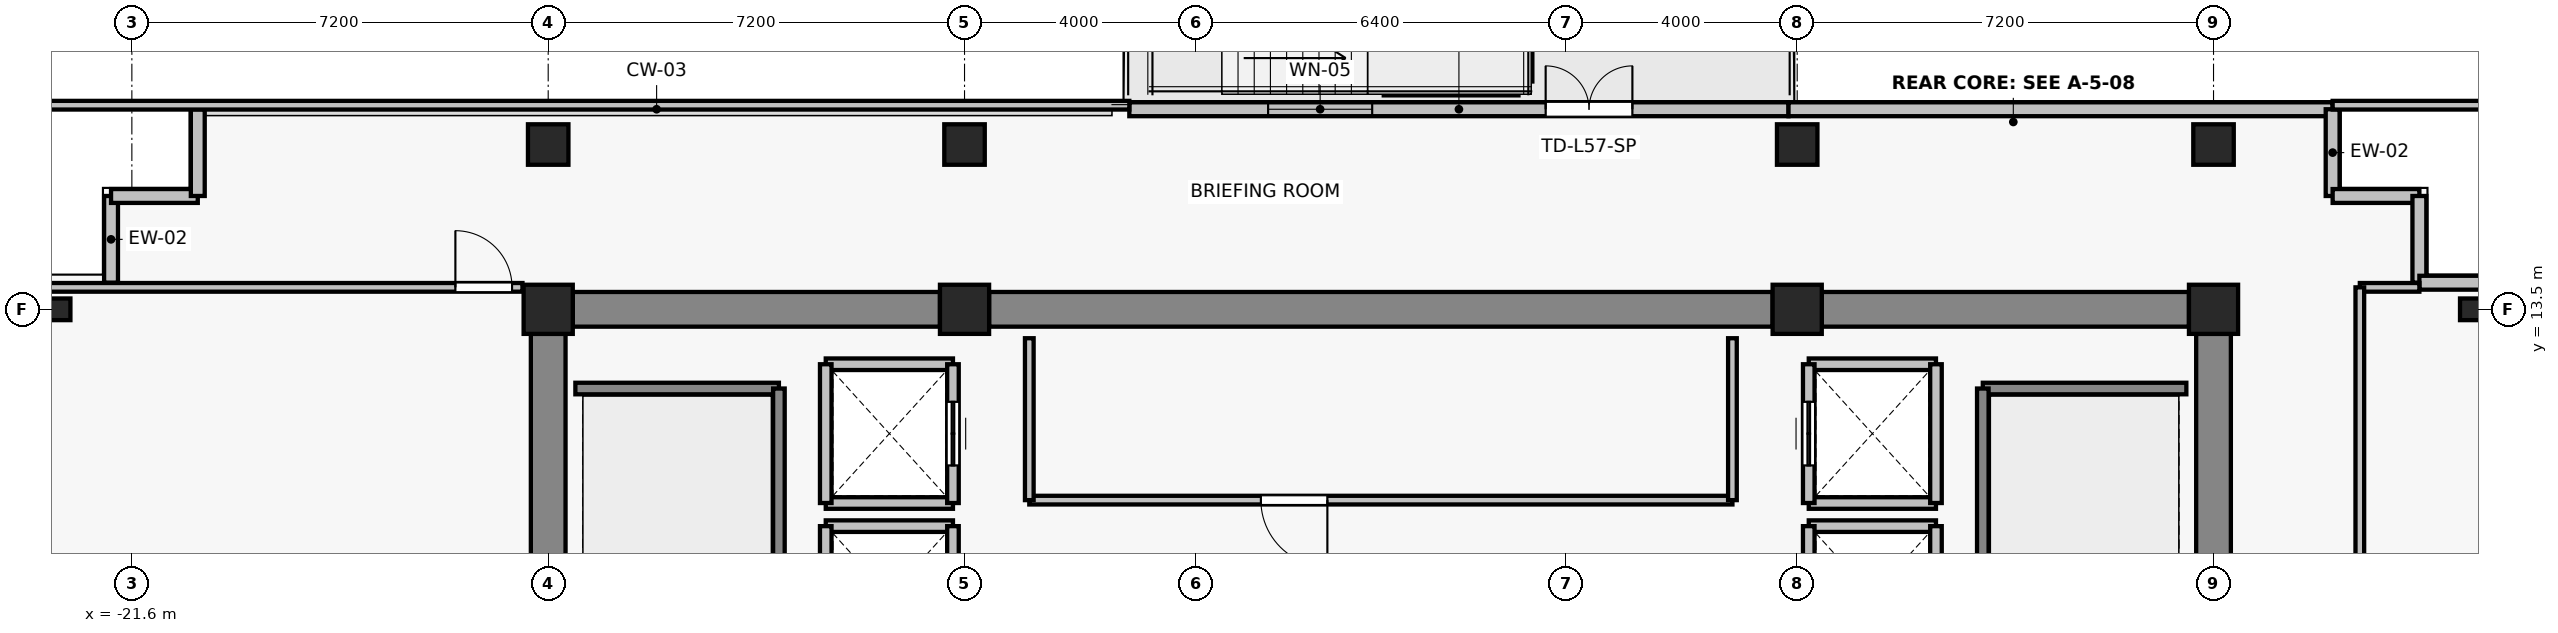
"""IFC4 building model, lengths in metres.
Left out: names, types, materials, properties, quantities, classifications, styles, units other than length and angle.
Written with IfcOpenShell. Run it as: python <this file> out.ifc"""

import sys

from ifc_helpers import new_model, si_unit, direction, frame, frame_2d, origin, origin_2d, place, context, subcontext, project, spatial, rectangle, i_section, extrude, source, transform, mapped, element, fill, save


model = new_model("IFC4")
c1 = context("Model", 3, precision=1e-05, world=origin(), true_north=direction((0.0, 1.0)))
c2 = subcontext(c1, "Body", "Model", "MODEL_VIEW")
j1 = project(units=[si_unit("LENGTHUNIT", "METRE"), si_unit("PLANEANGLEUNIT", "RADIAN")], contexts=[c1])
p1 = place(None, origin())
s1 = spatial("IfcSite", under=j1, at=p1, CompositionType="ELEMENT")
p2 = place(p1, origin())
s2 = spatial("IfcBuilding", under=s1, at=p2, CompositionType="ELEMENT")
p3 = place(p2, frame((0.0, 0.0, 205.6)))
s3 = spatial("IfcBuildingStorey", under=s2, at=p3, CompositionType="ELEMENT", Elevation=205.6)
for number, where, z_axis, x_axis in (
    (1, (-14.4, 13.5, 0.0), (0.0, 0.0, 1.0), (1.0, 0.0, 0.0)),
    (2, (-7.2, 13.5, 0.0), (0.0, 0.0, 1.0), (1.0, 0.0, 0.0)),
    (3, (7.2, 13.5, 0.0), (0.0, 0.0, 1.0), (1.0, 0.0, 0.0)),
    (4, (14.4, 13.5, 0.0), (0.0, 0.0, 1.0), (1.0, 0.0, 0.0)),
):
    element("IfcColumn", number, at=place(p3, frame(where, z_axis=z_axis, x_axis=x_axis)), inside=s3, PredefinedType="COLUMN", context=c2, shape_type="SweptSolid", body=[
        extrude(rectangle(XDim=0.85, YDim=0.85, at=origin_2d()), origin(), (0.0, 0.0, 1.0), 3.3),
    ])
for number, where, z_axis, x_axis in (
    (5, (-14.4, 16.35, 0.0), (0.0, 0.0, 1.0), (1.0, 0.0, 0.0)),
    (6, (-7.2, 16.35, 0.0), (0.0, 0.0, 1.0), (1.0, 0.0, 0.0)),
    (7, (7.2, 16.35, 0.0), (0.0, 0.0, 1.0), (1.0, 0.0, 0.0)),
    (8, (14.4, 16.35, 0.0), (0.0, 0.0, 1.0), (1.0, 0.0, 0.0)),
):
    element("IfcColumn", number, at=place(p3, frame(where, z_axis=z_axis, x_axis=x_axis)), inside=s3, PredefinedType="COLUMN", context=c2, shape_type="SweptSolid", body=[
        extrude(rectangle(XDim=0.7, YDim=0.7, at=origin_2d()), origin(), (0.0, 0.0, 1.0), 3.3),
    ])
for number, where, z_axis, x_axis in (
    (9, (-22.85, 13.5, 0.0), (0.0, 0.0, 1.0), (1.0, 0.0, 0.0)),
    (10, (18.85, 13.5, 0.0), (0.0, 0.0, 1.0), (1.0, 0.0, 0.0)),
):
    element("IfcColumn", number, at=place(p3, frame(where, z_axis=z_axis, x_axis=x_axis)), inside=s3, PredefinedType="COLUMN", context=c2, shape_type="SweptSolid", body=[
        extrude(i_section(OverallWidth=0.375, OverallDepth=0.375, WebThickness=0.017, FlangeThickness=0.027, FilletRadius=0.015, at=origin_2d()), origin(), (0.0, 0.0, 1.0), 3.3),
    ])
p4 = place(p3, frame((-13.975, 13.5, 0.0), z_axis=(0.0, 0.0, 1.0), x_axis=(1.0, 0.0, 0.0)))
e11 = element("IfcWall", 11, at=p4, inside=s3, PredefinedType="SHEAR", context=c2, shape_type="SweptSolid", body=[
    extrude(rectangle(XDim=6.35, YDim=0.6, at=frame_2d((3.175, 0.0))), origin(), (0.0, 0.0, 1.0), 3.075),
])
p5 = place(p3, frame((-6.775, 13.5, 0.0), z_axis=(0.0, 0.0, 1.0), x_axis=(1.0, 0.0, 0.0)))
e12 = element("IfcWall", 12, at=p5, inside=s3, PredefinedType="SHEAR", context=c2, shape_type="SweptSolid", body=[
    extrude(rectangle(XDim=13.55, YDim=0.6, at=frame_2d((6.775, 0.0))), origin(), (0.0, 0.0, 1.0), 3.075),
])
p6 = place(p3, frame((7.625, 13.5, 0.0), z_axis=(0.0, 0.0, 1.0), x_axis=(1.0, 0.0, 0.0)))
e13 = element("IfcWall", 13, at=p6, inside=s3, PredefinedType="SHEAR", context=c2, shape_type="SweptSolid", body=[
    extrude(rectangle(XDim=6.35, YDim=0.6, at=frame_2d((3.175, 0.0))), origin(), (0.0, 0.0, 1.0), 3.075),
])
for number, where, z_axis, x_axis in (
    (14, (-14.4, 7.025, 0.0), (0.0, 0.0, 1.0), (0.0, 1.0, 0.0)),
    (15, (14.4, 7.025, 0.0), (0.0, 0.0, 1.0), (0.0, 1.0, 0.0)),
):
    element("IfcWall", number, at=place(p3, frame(where, z_axis=z_axis, x_axis=x_axis)), inside=s3, PredefinedType="SHEAR", context=c2, shape_type="SweptSolid", body=[
        extrude(rectangle(XDim=6.05, YDim=0.6, at=frame_2d((3.025, 0.0))), origin(), (0.0, 0.0, 1.0), 3.075),
    ])
p7 = place(p3, frame((-4.35, 16.96, 0.0), z_axis=(0.0, 0.0, 1.0), x_axis=(1.0, 0.0, 0.0)))
e16 = element("IfcWall", 16, at=p7, inside=s3, PredefinedType="SOLIDWALL", context=c2, shape_type="SweptSolid", body=[
    extrude(rectangle(XDim=11.4, YDim=0.24, at=frame_2d((5.7, 0.0))), origin(), (0.0, 0.0, 1.0), 2.59),
])
p8 = place(p7, frame((7.2, 0.0, 0.0)))
e17 = element("IfcOpeningElement", 17, at=p8, cuts=e16, PredefinedType="OPENING", context=c2, shape_type="SweptSolid", body=[
    extrude(rectangle(XDim=1.5, YDim=2.2, at=frame_2d((0.75, 1.1))), frame((0.0, 0.13, 0.0), z_axis=(0.0, -1.0, 0.0), x_axis=(1.0, 0.0, 0.0)), (0.0, 0.0, 1.0), 0.26),
])
p9 = place(p7, frame((2.4, 0.0, 0.85)))
e18 = element("IfcOpeningElement", 18, at=p9, cuts=e16, PredefinedType="OPENING", context=c2, shape_type="SweptSolid", body=[
    extrude(rectangle(XDim=1.8, YDim=1.6, at=frame_2d((0.9, 0.8))), frame((0.0, 0.13, 0.0), z_axis=(0.0, -1.0, 0.0), x_axis=(1.0, 0.0, 0.0)), (0.0, 0.0, 1.0), 0.26),
])
for number, where, z_axis, x_axis in (
    (19, (-21.96, 15.46, 0.0), (0.0, 0.0, 1.0), (0.0, -1.0, 0.0)),
    (20, (-20.46, 15.46, 0.0), (0.0, 0.0, 1.0), (-1.0, 0.0, 0.0)),
    (21, (-20.46, 16.96, 0.0), (0.0, 0.0, 1.0), (0.0, -1.0, 0.0)),
):
    element("IfcWall", number, at=place(p3, frame(where, z_axis=z_axis, x_axis=x_axis)), inside=s3, PredefinedType="SOLIDWALL", context=c2, shape_type="SweptSolid", body=[
        extrude(rectangle(XDim=1.5, YDim=0.24, at=frame_2d((0.75, 0.0))), origin(), (0.0, 0.0, 1.0), 3.075),
    ])
p10 = place(p3, frame((16.46, 16.96, 0.0), z_axis=(0.0, 0.0, 1.0), x_axis=(-1.0, 0.0, 0.0)))
e22 = element("IfcWall", 22, at=p10, inside=s3, PredefinedType="SOLIDWALL", context=c2, shape_type="SweptSolid", body=[
    extrude(rectangle(XDim=9.41, YDim=0.24, at=frame_2d((4.705, 0.0))), origin(), (0.0, 0.0, 1.0), 2.59),
])
for number, where, z_axis, x_axis in (
    (23, (16.46, 15.46, 0.0), (0.0, 0.0, 1.0), (0.0, 1.0, 0.0)),
    (24, (17.96, 15.46, 0.0), (0.0, 0.0, 1.0), (-1.0, 0.0, 0.0)),
    (25, (17.96, 13.96, 0.0), (0.0, 0.0, 1.0), (0.0, 1.0, 0.0)),
    (26, (19.46, 13.96, 0.0), (0.0, 0.0, 1.0), (-1.0, 0.0, 0.0)),
):
    element("IfcWall", number, at=place(p3, frame(where, z_axis=z_axis, x_axis=x_axis)), inside=s3, PredefinedType="SOLIDWALL", context=c2, shape_type="SweptSolid", body=[
        extrude(rectangle(XDim=1.5, YDim=0.24, at=frame_2d((0.75, 0.0))), origin(), (0.0, 0.0, 1.0), 3.075),
    ])
p11 = place(p3, frame((2.52, 17.44, -0.25), z_axis=(0.0, 0.0, 1.0), x_axis=(0.0, 1.0, 0.0)))
e27 = element("IfcWall", 27, at=p11, inside=s3, PredefinedType="SOLIDWALL", context=c2, shape_type="SweptSolid", body=[
    extrude(rectangle(XDim=2.18, YDim=0.2, at=frame_2d((1.09, 0.0))), origin(), (0.0, 0.0, 1.0), 1.7),
])
p12 = place(p3, frame((0.05, 17.3, -0.25), z_axis=(0.0, 0.0, 1.0), x_axis=(1.0, 0.0, 0.0)))
e28 = element("IfcWall", 28, at=p12, inside=s3, PredefinedType="SOLIDWALL", context=c2, shape_type="SweptSolid", body=[
    extrude(rectangle(XDim=2.33, YDim=0.2, at=frame_2d((1.165, 0.0))), origin(), (0.0, 0.0, 1.0), 1.7),
])
p13 = place(p3, frame((-9.6, 9.75, 0.0), z_axis=(0.0, 0.0, 1.0), x_axis=(1.0, 0.0, 0.0)))
e29 = element("IfcWall", 29, at=p13, inside=s3, PredefinedType="SOLIDWALL", context=c2, shape_type="SweptSolid", body=[
    extrude(rectangle(XDim=2.2, YDim=0.2, at=frame_2d((1.1, 0.0))), origin(), (0.0, 0.0, 1.0), 2.615),
])
p14 = place(p3, frame((-9.6, 7.35, 0.0), z_axis=(0.0, 0.0, 1.0), x_axis=(0.0, 1.0, 0.0)))
e30 = element("IfcWall", 30, at=p14, inside=s3, PredefinedType="SOLIDWALL", context=c2, shape_type="SweptSolid", body=[
    extrude(rectangle(XDim=2.4, YDim=0.2, at=frame_2d((1.2, 0.0))), origin(), (0.0, 0.0, 1.0), 3.075),
])
p15 = place(p3, frame((-7.4, 9.75, 0.0), z_axis=(0.0, 0.0, 1.0), x_axis=(0.0, -1.0, 0.0)))
e31 = element("IfcWall", 31, at=p15, inside=s3, PredefinedType="SOLIDWALL", context=c2, shape_type="SweptSolid", body=[
    extrude(rectangle(XDim=2.4, YDim=0.2, at=frame_2d((1.2, 0.0))), origin(), (0.0, 0.0, 1.0), 2.615),
])
p16 = place(p15, frame((0.65, 0.0, 0.0)))
e32 = element("IfcOpeningElement", 32, at=p16, cuts=e31, PredefinedType="OPENING", context=c2, shape_type="SweptSolid", body=[
    extrude(rectangle(XDim=1.1, YDim=2.2, at=frame_2d((0.55, 1.1))), frame((0.0, 0.11, 0.0), z_axis=(0.0, -1.0, 0.0), x_axis=(1.0, 0.0, 0.0)), (0.0, 0.0, 1.0), 0.22),
])
for number, where, z_axis, x_axis in (
    (33, (-7.4, 10.15, 0.0), (0.0, 0.0, 1.0), (-1.0, 0.0, 0.0)),
    (34, (-9.6, 12.55, 0.0), (0.0, 0.0, 1.0), (1.0, 0.0, 0.0)),
):
    element("IfcWall", number, at=place(p3, frame(where, z_axis=z_axis, x_axis=x_axis)), inside=s3, PredefinedType="SOLIDWALL", context=c2, shape_type="SweptSolid", body=[
        extrude(rectangle(XDim=2.2, YDim=0.2, at=frame_2d((1.1, 0.0))), origin(), (0.0, 0.0, 1.0), 2.615),
    ])
p17 = place(p3, frame((-9.6, 10.15, 0.0), z_axis=(0.0, 0.0, 1.0), x_axis=(0.0, 1.0, 0.0)))
e35 = element("IfcWall", 35, at=p17, inside=s3, PredefinedType="SOLIDWALL", context=c2, shape_type="SweptSolid", body=[
    extrude(rectangle(XDim=2.4, YDim=0.2, at=frame_2d((1.2, 0.0))), origin(), (0.0, 0.0, 1.0), 3.075),
])
p18 = place(p3, frame((-7.4, 12.55, 0.0), z_axis=(0.0, 0.0, 1.0), x_axis=(0.0, -1.0, 0.0)))
e36 = element("IfcWall", 36, at=p18, inside=s3, PredefinedType="SOLIDWALL", context=c2, shape_type="SweptSolid", body=[
    extrude(rectangle(XDim=2.4, YDim=0.2, at=frame_2d((1.2, 0.0))), origin(), (0.0, 0.0, 1.0), 2.615),
])
p19 = place(p18, frame((0.65, 0.0, 0.0)))
e37 = element("IfcOpeningElement", 37, at=p19, cuts=e36, PredefinedType="OPENING", context=c2, shape_type="SweptSolid", body=[
    extrude(rectangle(XDim=1.1, YDim=2.2, at=frame_2d((0.55, 1.1))), frame((0.0, 0.11, 0.0), z_axis=(0.0, -1.0, 0.0), x_axis=(1.0, 0.0, 0.0)), (0.0, 0.0, 1.0), 0.22),
])
p20 = place(p3, frame((7.4, 9.75, 0.0), z_axis=(0.0, 0.0, 1.0), x_axis=(1.0, 0.0, 0.0)))
e38 = element("IfcWall", 38, at=p20, inside=s3, PredefinedType="SOLIDWALL", context=c2, shape_type="SweptSolid", body=[
    extrude(rectangle(XDim=2.2, YDim=0.2, at=frame_2d((1.1, 0.0))), origin(), (0.0, 0.0, 1.0), 2.615),
])
p21 = place(p3, frame((7.4, 7.35, 0.0), z_axis=(0.0, 0.0, 1.0), x_axis=(0.0, 1.0, 0.0)))
e39 = element("IfcWall", 39, at=p21, inside=s3, PredefinedType="SOLIDWALL", context=c2, shape_type="SweptSolid", body=[
    extrude(rectangle(XDim=2.4, YDim=0.2, at=frame_2d((1.2, 0.0))), origin(), (0.0, 0.0, 1.0), 2.615),
])
p22 = place(p21, frame((0.65, 0.0, 0.0)))
e40 = element("IfcOpeningElement", 40, at=p22, cuts=e39, PredefinedType="OPENING", context=c2, shape_type="SweptSolid", body=[
    extrude(rectangle(XDim=1.1, YDim=2.2, at=frame_2d((0.55, 1.1))), frame((0.0, 0.11, 0.0), z_axis=(0.0, -1.0, 0.0), x_axis=(1.0, 0.0, 0.0)), (0.0, 0.0, 1.0), 0.22),
])
p23 = place(p3, frame((9.6, 9.75, 0.0), z_axis=(0.0, 0.0, 1.0), x_axis=(0.0, -1.0, 0.0)))
e41 = element("IfcWall", 41, at=p23, inside=s3, PredefinedType="SOLIDWALL", context=c2, shape_type="SweptSolid", body=[
    extrude(rectangle(XDim=2.4, YDim=0.2, at=frame_2d((1.2, 0.0))), origin(), (0.0, 0.0, 1.0), 3.075),
])
for number, where, z_axis, x_axis in (
    (42, (9.6, 10.15, 0.0), (0.0, 0.0, 1.0), (-1.0, 0.0, 0.0)),
    (43, (7.4, 12.55, 0.0), (0.0, 0.0, 1.0), (1.0, 0.0, 0.0)),
):
    element("IfcWall", number, at=place(p3, frame(where, z_axis=z_axis, x_axis=x_axis)), inside=s3, PredefinedType="SOLIDWALL", context=c2, shape_type="SweptSolid", body=[
        extrude(rectangle(XDim=2.2, YDim=0.2, at=frame_2d((1.1, 0.0))), origin(), (0.0, 0.0, 1.0), 2.615),
    ])
p24 = place(p3, frame((7.4, 10.15, 0.0), z_axis=(0.0, 0.0, 1.0), x_axis=(0.0, 1.0, 0.0)))
e44 = element("IfcWall", 44, at=p24, inside=s3, PredefinedType="SOLIDWALL", context=c2, shape_type="SweptSolid", body=[
    extrude(rectangle(XDim=2.4, YDim=0.2, at=frame_2d((1.2, 0.0))), origin(), (0.0, 0.0, 1.0), 2.615),
])
p25 = place(p24, frame((0.65, 0.0, 0.0)))
e45 = element("IfcOpeningElement", 45, at=p25, cuts=e44, PredefinedType="OPENING", context=c2, shape_type="SweptSolid", body=[
    extrude(rectangle(XDim=1.1, YDim=2.2, at=frame_2d((0.55, 1.1))), frame((0.0, 0.11, 0.0), z_axis=(0.0, -1.0, 0.0), x_axis=(1.0, 0.0, 0.0)), (0.0, 0.0, 1.0), 0.22),
])
p26 = place(p3, frame((9.6, 12.55, 0.0), z_axis=(0.0, 0.0, 1.0), x_axis=(0.0, -1.0, 0.0)))
e46 = element("IfcWall", 46, at=p26, inside=s3, PredefinedType="SOLIDWALL", context=c2, shape_type="SweptSolid", body=[
    extrude(rectangle(XDim=2.4, YDim=0.2, at=frame_2d((1.2, 0.0))), origin(), (0.0, 0.0, 1.0), 3.075),
])
p27 = place(p3, frame((-13.93, 12.13, 0.0), z_axis=(0.0, 0.0, 1.0), x_axis=(1.0, 0.0, 0.0)))
e47 = element("IfcWall", 47, at=p27, inside=s3, PredefinedType="SOLIDWALL", context=c2, shape_type="SweptSolid", body=[
    extrude(rectangle(XDim=3.52, YDim=0.2, at=frame_2d((1.76, 0.0))), origin(), (0.0, 0.0, 1.0), 3.075),
])
p28 = place(p3, frame((-10.41, 12.13, 0.0), z_axis=(0.0, 0.0, 1.0), x_axis=(0.0, -1.0, 0.0)))
e48 = element("IfcWall", 48, at=p28, inside=s3, PredefinedType="SOLIDWALL", context=c2, shape_type="SweptSolid", body=[
    extrude(rectangle(XDim=8.84, YDim=0.2, at=frame_2d((4.42, 0.0))), origin(), (0.0, 0.0, 1.0), 3.075),
])
p29 = place(p3, frame((10.41, 12.13, 0.0), z_axis=(0.0, 0.0, 1.0), x_axis=(1.0, 0.0, 0.0)))
e49 = element("IfcWall", 49, at=p29, inside=s3, PredefinedType="SOLIDWALL", context=c2, shape_type="SweptSolid", body=[
    extrude(rectangle(XDim=3.52, YDim=0.2, at=frame_2d((1.76, 0.0))), origin(), (0.0, 0.0, 1.0), 3.075),
])
p30 = place(p3, frame((10.41, 3.29, 0.0), z_axis=(0.0, 0.0, 1.0), x_axis=(0.0, 1.0, 0.0)))
e50 = element("IfcWall", 50, at=p30, inside=s3, PredefinedType="SOLIDWALL", context=c2, shape_type="SweptSolid", body=[
    extrude(rectangle(XDim=8.84, YDim=0.2, at=frame_2d((4.42, 0.0))), origin(), (0.0, 0.0, 1.0), 3.075),
])
p31 = place(p3, frame((6.08, 10.2, 0.0), z_axis=(0.0, 0.0, 1.0), x_axis=(-1.0, 0.0, 0.0)))
e51 = element("IfcWall", 51, at=p31, inside=s3, PredefinedType="PARTITIONING", context=c2, shape_type="SweptSolid", body=[
    extrude(rectangle(XDim=12.16, YDim=0.15, at=frame_2d((6.08, 0.0))), origin(), (0.0, 0.0, 1.0), 2.59),
])
p32 = place(p31, frame((7.005, 0.0, 0.0)))
e52 = element("IfcOpeningElement", 52, at=p32, cuts=e51, PredefinedType="OPENING", context=c2, shape_type="SweptSolid", body=[
    extrude(rectangle(XDim=1.15, YDim=2.15, at=frame_2d((0.575, 1.075))), frame((0.0, 0.085, 0.0), z_axis=(0.0, -1.0, 0.0), x_axis=(1.0, 0.0, 0.0)), (0.0, 0.0, 1.0), 0.17),
])
for number, where, z_axis, x_axis in (
    (53, (-6.08, 10.2, 0.0), (0.0, 0.0, 1.0), (0.0, 1.0, 0.0)),
    (54, (6.08, 13.0, 0.0), (0.0, 0.0, 1.0), (0.0, -1.0, 0.0)),
):
    element("IfcWall", number, at=place(p3, frame(where, z_axis=z_axis, x_axis=x_axis)), inside=s3, PredefinedType="PARTITIONING", context=c2, shape_type="SweptSolid", body=[
        extrude(rectangle(XDim=2.8, YDim=0.15, at=frame_2d((1.4, 0.0))), origin(), (0.0, 0.0, 1.0), 3.075),
    ])
p33 = place(p3, frame((-23.53, 13.88, 0.0), z_axis=(0.0, 0.0, 1.0), x_axis=(1.0, 0.0, 0.0)))
e55 = element("IfcWall", 55, at=p33, inside=s3, PredefinedType="PARTITIONING", context=c2, shape_type="SweptSolid", body=[
    extrude(rectangle(XDim=8.685, YDim=0.15, at=frame_2d((4.343, 0.0))), origin(), (0.0, 0.0, 1.0), 3.075),
])
p34 = place(p33, frame((7.525, 0.0, 0.0)))
e56 = element("IfcOpeningElement", 56, at=p34, cuts=e55, PredefinedType="OPENING", context=c2, shape_type="SweptSolid", body=[
    extrude(rectangle(XDim=0.98, YDim=2.15, at=frame_2d((0.49, 1.075))), frame((0.0, 0.085, 0.0), z_axis=(0.0, -1.0, 0.0), x_axis=(1.0, 0.0, 0.0)), (0.0, 0.0, 1.0), 0.17),
])
p35 = place(p3, frame((16.93, 13.88, 0.0), z_axis=(0.0, 0.0, 1.0), x_axis=(1.0, 0.0, 0.0)))
e57 = element("IfcWall", 57, at=p35, inside=s3, PredefinedType="PARTITIONING", context=c2, shape_type="SweptSolid", body=[
    extrude(rectangle(XDim=1.03, YDim=0.15, at=frame_2d((0.515, 0.0))), origin(), (0.0, 0.0, 1.0), 3.075),
])
p36 = place(p3, frame((16.93, -1.77, 0.0), z_axis=(0.0, 0.0, 1.0), x_axis=(0.0, 1.0, 0.0)))
e58 = element("IfcWall", 58, at=p36, inside=s3, PredefinedType="PARTITIONING", context=c2, shape_type="SweptSolid", body=[
    extrude(rectangle(XDim=15.65, YDim=0.15, at=frame_2d((7.825, 0.0))), origin(), (0.0, 0.0, 1.0), 2.615),
])
p37 = place(p36, frame((7.335, 0.0, 0.0)))
e59 = element("IfcOpeningElement", 59, at=p37, cuts=e58, PredefinedType="OPENING", context=c2, shape_type="SweptSolid", body=[
    extrude(rectangle(XDim=0.98, YDim=2.15, at=frame_2d((0.49, 1.075))), frame((0.0, 0.085, 0.0), z_axis=(0.0, -1.0, 0.0), x_axis=(1.0, 0.0, 0.0)), (0.0, 0.0, 1.0), 0.17),
])
p38 = place(p3, frame((-23.53, 17.03, 0.0), z_axis=(0.0, 0.0, 1.0), x_axis=(1.0, 0.0, 0.0)))
e60 = element("IfcWall", 60, at=p38, inside=s3, PredefinedType="PARTITIONING", context=c2, shape_type="SweptSolid", body=[
    extrude(rectangle(XDim=19.18, YDim=0.15, at=frame_2d((9.59, 0.0))), origin(), (0.0, 0.0, 1.0), 2.59),
])
p39 = place(p3, frame((16.46, 17.03, 0.0), z_axis=(0.0, 0.0, 1.0), x_axis=(1.0, 0.0, 0.0)))
e61 = element("IfcWall", 61, at=p39, inside=s3, PredefinedType="PARTITIONING", context=c2, shape_type="SweptSolid", body=[
    extrude(rectangle(XDim=3.07, YDim=0.15, at=frame_2d((1.535, 0.0))), origin(), (0.0, 0.0, 1.0), 2.59),
])
m1 = source(origin(), c2, "Body", "SweptSolid", [
    extrude(rectangle(XDim=1.5, YDim=2.2, at=frame_2d((0.75, 1.1))), frame((0.0, 0.025, 0.0), z_axis=(0.0, -1.0, 0.0), x_axis=(1.0, 0.0, 0.0)), (0.0, 0.0, 1.0), 0.05),
])
p40 = place(p8, origin())
e62 = element("IfcDoor", 62, at=p40, inside=s3, OperationType="DOUBLE_DOOR_SINGLE_SWING", PredefinedType="DOOR", context=c2, shape_type="MappedRepresentation", body=[
    mapped(m1, transform((0.0, 0.0, 0.0), x_axis=(1.0, 0.0, 0.0), y_axis=(0.0, 1.0, 0.0), z_axis=(0.0, 0.0, 1.0), scale=1.0)),
])
fill(e17, e62)
m2 = source(origin(), c2, "Body", "SweptSolid", [
    extrude(rectangle(XDim=1.8, YDim=1.6, at=frame_2d((0.9, 0.8))), frame((0.0, 0.03, 0.0), z_axis=(0.0, -1.0, 0.0), x_axis=(1.0, 0.0, 0.0)), (0.0, 0.0, 1.0), 0.06),
])
p41 = place(p9, origin())
e63 = element("IfcWindow", 63, at=p41, inside=s3, PartitioningType="SINGLE_PANEL", PredefinedType="WINDOW", context=c2, shape_type="MappedRepresentation", body=[
    mapped(m2, transform((0.0, 0.0, 0.0), x_axis=(1.0, 0.0, 0.0), y_axis=(0.0, 1.0, 0.0), z_axis=(0.0, 0.0, 1.0), scale=1.0)),
])
fill(e18, e63)
m3 = source(origin(), c2, "Body", "SweptSolid", [
    extrude(rectangle(XDim=1.1, YDim=2.2, at=frame_2d((0.55, 1.1))), frame((0.0, 0.025, 0.0), z_axis=(0.0, -1.0, 0.0), x_axis=(1.0, 0.0, 0.0)), (0.0, 0.0, 1.0), 0.05),
])
p42 = place(p19, origin())
e64 = element("IfcDoor", 64, at=p42, inside=s3, OperationType="DOUBLE_DOOR_SLIDING", PredefinedType="DOOR", context=c2, shape_type="MappedRepresentation", body=[
    mapped(m3, transform((0.0, 0.0, 0.0), x_axis=(1.0, 0.0, 0.0), y_axis=(0.0, 1.0, 0.0), z_axis=(0.0, 0.0, 1.0), scale=1.0)),
])
fill(e37, e64)
p43 = place(p25, origin())
e65 = element("IfcDoor", 65, at=p43, inside=s3, OperationType="DOUBLE_DOOR_SLIDING", PredefinedType="DOOR", context=c2, shape_type="MappedRepresentation", body=[
    mapped(m3, transform((0.0, 0.0, 0.0), x_axis=(1.0, 0.0, 0.0), y_axis=(0.0, 1.0, 0.0), z_axis=(0.0, 0.0, 1.0), scale=1.0)),
])
fill(e45, e65)
m4 = source(origin(), c2, "Body", "SweptSolid", [
    extrude(rectangle(XDim=1.15, YDim=2.15, at=frame_2d((0.575, 1.075))), frame((0.0, 0.025, 0.0), z_axis=(0.0, -1.0, 0.0), x_axis=(1.0, 0.0, 0.0)), (0.0, 0.0, 1.0), 0.05),
])
p44 = place(p32, origin())
e66 = element("IfcDoor", 66, at=p44, inside=s3, OperationType="SINGLE_SWING_LEFT", PredefinedType="DOOR", context=c2, shape_type="MappedRepresentation", body=[
    mapped(m4, transform((0.0, 0.0, 0.0), x_axis=(1.0, 0.0, 0.0), y_axis=(0.0, 1.0, 0.0), z_axis=(0.0, 0.0, 1.0), scale=1.0)),
])
fill(e52, e66)
m5 = source(origin(), c2, "Body", "SweptSolid", [
    extrude(rectangle(XDim=0.98, YDim=2.15, at=frame_2d((0.49, 1.075))), frame((0.0, 0.025, 0.0), z_axis=(0.0, -1.0, 0.0), x_axis=(1.0, 0.0, 0.0)), (0.0, 0.0, 1.0), 0.05),
])
p45 = place(p34, origin())
e67 = element("IfcDoor", 67, at=p45, inside=s3, OperationType="SINGLE_SWING_LEFT", PredefinedType="DOOR", context=c2, shape_type="MappedRepresentation", body=[
    mapped(m5, transform((0.0, 0.0, 0.0), x_axis=(1.0, 0.0, 0.0), y_axis=(0.0, 1.0, 0.0), z_axis=(0.0, 0.0, 1.0), scale=1.0)),
])
fill(e56, e67)
save(model, sys.argv[1])
